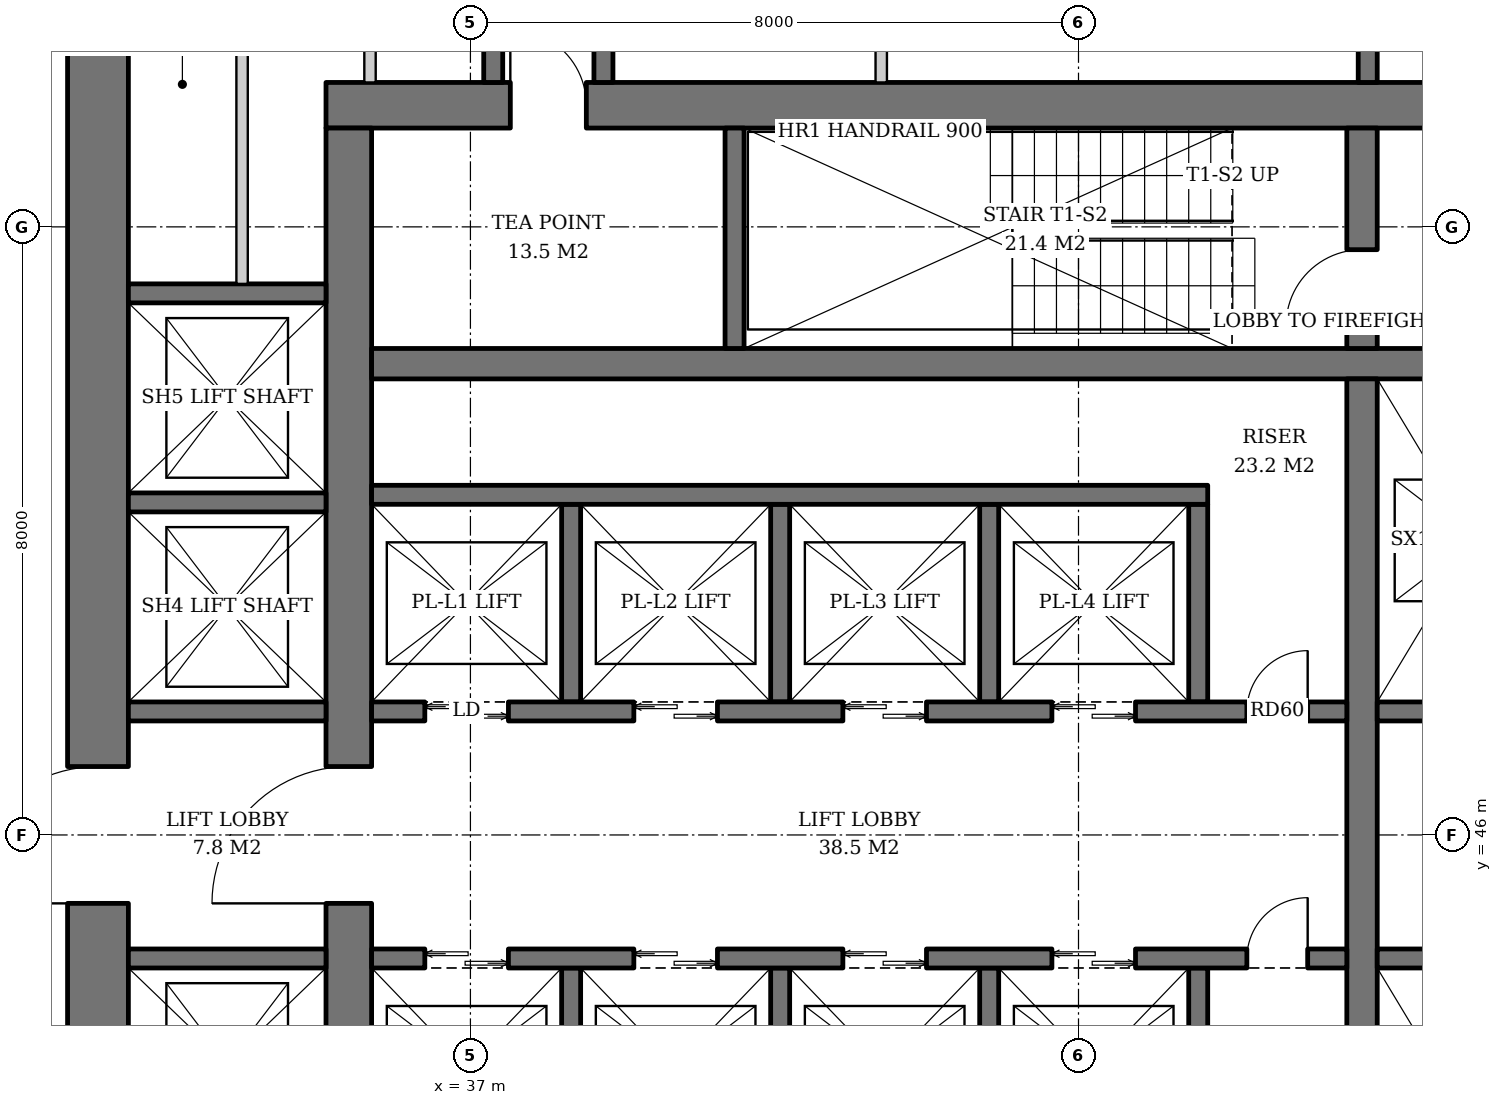
"""IFC4 building model, lengths in metres.
Left out: names, types, materials, properties, quantities, classifications, styles, units other than length and angle.
Written with IfcOpenShell. Run it as: python <this file> out.ifc"""

import sys

from ifc_helpers import new_model, si_unit, direction, frame, frame_2d, origin, place, context, subcontext, project, spatial, rectangle, extrude, element, fill, save


model = new_model("IFC4")
c1 = context("Model", 3, precision=1e-05, world=origin(), true_north=direction((0.0, 1.0)))
c2 = subcontext(c1, "Body", "Model", "MODEL_VIEW")
j1 = project(units=[si_unit("LENGTHUNIT", "METRE"), si_unit("PLANEANGLEUNIT", "RADIAN")], contexts=[c1])
p1 = place(None, origin())
s1 = spatial("IfcSite", under=j1, at=p1, CompositionType="ELEMENT")
p2 = place(p1, origin())
s2 = spatial("IfcBuilding", under=s1, at=p2, CompositionType="ELEMENT")
p3 = place(p2, frame((0.0, 0.0, 78.0)))
s3 = spatial("IfcBuildingStorey", under=s2, at=p3, CompositionType="ELEMENT", Elevation=78.0)
p4 = place(p3, frame((35.1, 55.6, 0.0), z_axis=(0.0, 0.0, 1.0), x_axis=(1.0, 0.0, 0.0)))
e1 = element("IfcWall", 1, at=p4, inside=s3, PredefinedType="SHEAR", context=c2, shape_type="SweptSolid", body=[
    extrude(rectangle(XDim=19.8, YDim=0.6, at=frame_2d((9.9, 0.0))), origin(), (0.0, 0.0, 1.0), 3.8),
])
p5 = place(p4, frame((14.54, 0.0, 0.0)))
e2 = element("IfcOpeningElement", 2, at=p5, cuts=e1, PredefinedType="OPENING", context=c2, shape_type="SweptSolid", body=[
    extrude(rectangle(XDim=1.0, YDim=2.1, at=frame_2d((0.5, 1.05))), frame((0.0, 0.31, 0.0), z_axis=(0.0, -1.0, 0.0), x_axis=(1.0, 0.0, 0.0)), (0.0, 0.0, 1.0), 0.62),
])
p6 = place(p4, frame((2.425, 0.0, 0.0)))
e3 = element("IfcOpeningElement", 3, at=p6, cuts=e1, PredefinedType="OPENING", context=c2, shape_type="SweptSolid", body=[
    extrude(rectangle(XDim=1.0, YDim=2.1, at=frame_2d((0.5, 1.05))), frame((0.0, 0.31, 0.0), z_axis=(0.0, -1.0, 0.0), x_axis=(1.0, 0.0, 0.0)), (0.0, 0.0, 1.0), 0.62),
])
p7 = place(p3, frame((35.4, 36.7, 0.0), z_axis=(0.0, 0.0, 1.0), x_axis=(0.0, 1.0, 0.0)))
e4 = element("IfcWall", 4, at=p7, inside=s3, PredefinedType="SHEAR", context=c2, shape_type="SweptSolid", body=[
    extrude(rectangle(XDim=18.6, YDim=0.6, at=frame_2d((9.3, 0.0))), origin(), (0.0, 0.0, 1.0), 3.8),
])
p8 = place(p7, frame((8.4, 0.0, 0.0)))
e5 = element("IfcOpeningElement", 5, at=p8, cuts=e4, PredefinedType="OPENING", context=c2, shape_type="SweptSolid", body=[
    extrude(rectangle(XDim=1.8, YDim=2.4, at=frame_2d((0.9, 1.2))), frame((0.0, 0.31, 0.0), z_axis=(0.0, -1.0, 0.0), x_axis=(1.0, 0.0, 0.0)), (0.0, 0.0, 1.0), 0.62),
])
p9 = place(p3, frame((32.1, 33.5, 0.0), z_axis=(0.0, 0.0, 1.0), x_axis=(0.0, 1.0, 0.0)))
e6 = element("IfcWall", 6, at=p9, inside=s3, PredefinedType="SHEAR", context=c2, shape_type="SweptSolid", body=[
    extrude(rectangle(XDim=25.0, YDim=0.8, at=frame_2d((12.5, 0.0))), origin(), (0.0, 0.0, 1.0), 3.8),
])
p10 = place(p9, frame((11.6, 0.0, 0.0)))
e7 = element("IfcOpeningElement", 7, at=p10, cuts=e6, PredefinedType="OPENING", context=c2, shape_type="SweptSolid", body=[
    extrude(rectangle(XDim=1.8, YDim=2.4, at=frame_2d((0.9, 1.2))), frame((0.0, 0.41, 0.0), z_axis=(0.0, -1.0, 0.0), x_axis=(1.0, 0.0, 0.0)), (0.0, 0.0, 1.0), 0.82),
])
p11 = place(p3, frame((35.7, 52.2, 0.0), z_axis=(0.0, 0.0, 1.0), x_axis=(1.0, 0.0, 0.0)))
e8 = element("IfcWall", 8, at=p11, inside=s3, PredefinedType="SHEAR", context=c2, shape_type="SweptSolid", body=[
    extrude(rectangle(XDim=18.6, YDim=0.4, at=frame_2d((9.3, 0.0))), origin(), (0.0, 0.0, 1.0), 3.8),
])
p12 = place(p3, frame((48.73, 40.0, 0.0), z_axis=(0.0, 0.0, 1.0), x_axis=(0.0, 1.0, 0.0)))
e9 = element("IfcWall", 9, at=p12, inside=s3, PredefinedType="SHEAR", context=c2, shape_type="SweptSolid", body=[
    extrude(rectangle(XDim=12.0, YDim=0.4, at=frame_2d((6.0, 0.0))), origin(), (0.0, 0.0, 1.0), 3.8),
])
p13 = place(p3, frame((48.73, 52.4, 0.0), z_axis=(0.0, 0.0, 1.0), x_axis=(0.0, 1.0, 0.0)))
e10 = element("IfcWall", 10, at=p13, inside=s3, PredefinedType="SHEAR", context=c2, shape_type="SweptSolid", body=[
    extrude(rectangle(XDim=2.9, YDim=0.4, at=frame_2d((1.45, 0.0))), origin(), (0.0, 0.0, 1.0), 3.8),
])
p14 = place(p13, frame((0.3, 0.0, 0.0)))
e11 = element("IfcOpeningElement", 11, at=p14, cuts=e10, PredefinedType="OPENING", context=c2, shape_type="SweptSolid", body=[
    extrude(rectangle(XDim=1.0, YDim=2.1, at=frame_2d((0.5, 1.05))), frame((0.0, 0.21, 0.0), z_axis=(0.0, -1.0, 0.0), x_axis=(1.0, 0.0, 0.0)), (0.0, 0.0, 1.0), 0.42),
])
p15 = place(p3, frame((40.475, 52.4, 0.0), z_axis=(0.0, 0.0, 1.0), x_axis=(0.0, 1.0, 0.0)))
e12 = element("IfcWall", 12, at=p15, inside=s3, PredefinedType="SHEAR", context=c2, shape_type="SweptSolid", body=[
    extrude(rectangle(XDim=2.9, YDim=0.25, at=frame_2d((1.45, 0.0))), origin(), (0.0, 0.0, 1.0), 3.8),
])
for number, where, z_axis, x_axis in (
    (13, (38.325, 47.75, 0.0), (0.0, 0.0, 1.0), (0.0, 1.0, 0.0)),
    (14, (41.075, 47.75, 0.0), (0.0, 0.0, 1.0), (0.0, 1.0, 0.0)),
    (15, (43.825, 47.75, 0.0), (0.0, 0.0, 1.0), (0.0, 1.0, 0.0)),
    (16, (46.575, 47.75, 0.0), (0.0, 0.0, 1.0), (0.0, 1.0, 0.0)),
):
    element("IfcWall", number, at=place(p3, frame(where, z_axis=z_axis, x_axis=x_axis)), inside=s3, PredefinedType="SHEAR", context=c2, shape_type="SweptSolid", body=[
        extrude(rectangle(XDim=2.6, YDim=0.25, at=frame_2d((1.3, 0.0))), origin(), (0.0, 0.0, 1.0), 3.8),
    ])
p16 = place(p3, frame((35.7, 50.475, 0.0), z_axis=(0.0, 0.0, 1.0), x_axis=(1.0, 0.0, 0.0)))
e17 = element("IfcWall", 17, at=p16, inside=s3, PredefinedType="SHEAR", context=c2, shape_type="SweptSolid", body=[
    extrude(rectangle(XDim=11.0, YDim=0.25, at=frame_2d((5.5, 0.0))), origin(), (0.0, 0.0, 1.0), 3.8),
])
p17 = place(p3, frame((35.7, 47.625, 0.0), z_axis=(0.0, 0.0, 1.0), x_axis=(1.0, 0.0, 0.0)))
e18 = element("IfcWall", 18, at=p17, inside=s3, PredefinedType="SHEAR", context=c2, shape_type="SweptSolid", body=[
    extrude(rectangle(XDim=12.83, YDim=0.25, at=frame_2d((6.415, 0.0))), origin(), (0.0, 0.0, 1.0), 3.8),
])
p18 = place(p17, frame((0.7, 0.0, 0.0)))
e19 = element("IfcOpeningElement", 19, at=p18, cuts=e18, PredefinedType="OPENING", context=c2, shape_type="SweptSolid", body=[
    extrude(rectangle(XDim=1.1, YDim=2.2, at=frame_2d((0.55, 1.1))), frame((0.0, 0.135, 0.0), z_axis=(0.0, -1.0, 0.0), x_axis=(1.0, 0.0, 0.0)), (0.0, 0.0, 1.0), 0.27),
])
p19 = place(p17, frame((3.45, 0.0, 0.0)))
e20 = element("IfcOpeningElement", 20, at=p19, cuts=e18, PredefinedType="OPENING", context=c2, shape_type="SweptSolid", body=[
    extrude(rectangle(XDim=1.1, YDim=2.2, at=frame_2d((0.55, 1.1))), frame((0.0, 0.135, 0.0), z_axis=(0.0, -1.0, 0.0), x_axis=(1.0, 0.0, 0.0)), (0.0, 0.0, 1.0), 0.27),
])
p20 = place(p17, frame((6.2, 0.0, 0.0)))
e21 = element("IfcOpeningElement", 21, at=p20, cuts=e18, PredefinedType="OPENING", context=c2, shape_type="SweptSolid", body=[
    extrude(rectangle(XDim=1.1, YDim=2.2, at=frame_2d((0.55, 1.1))), frame((0.0, 0.135, 0.0), z_axis=(0.0, -1.0, 0.0), x_axis=(1.0, 0.0, 0.0)), (0.0, 0.0, 1.0), 0.27),
])
p21 = place(p17, frame((8.95, 0.0, 0.0)))
e22 = element("IfcOpeningElement", 22, at=p21, cuts=e18, PredefinedType="OPENING", context=c2, shape_type="SweptSolid", body=[
    extrude(rectangle(XDim=1.1, YDim=2.2, at=frame_2d((0.55, 1.1))), frame((0.0, 0.135, 0.0), z_axis=(0.0, -1.0, 0.0), x_axis=(1.0, 0.0, 0.0)), (0.0, 0.0, 1.0), 0.27),
])
p22 = place(p17, frame((11.515, 0.0, 0.0)))
e23 = element("IfcOpeningElement", 23, at=p22, cuts=e18, PredefinedType="OPENING", context=c2, shape_type="SweptSolid", body=[
    extrude(rectangle(XDim=0.8, YDim=2.0, at=frame_2d((0.4, 1.0))), frame((0.0, 0.135, 0.0), z_axis=(0.0, -1.0, 0.0), x_axis=(1.0, 0.0, 0.0)), (0.0, 0.0, 1.0), 0.27),
])
for number, where, z_axis, x_axis in (
    (24, (38.325, 44.25, 0.0), (0.0, 0.0, 1.0), (0.0, -1.0, 0.0)),
    (25, (41.075, 44.25, 0.0), (0.0, 0.0, 1.0), (0.0, -1.0, 0.0)),
    (26, (43.825, 44.25, 0.0), (0.0, 0.0, 1.0), (0.0, -1.0, 0.0)),
    (27, (46.575, 44.25, 0.0), (0.0, 0.0, 1.0), (0.0, -1.0, 0.0)),
):
    element("IfcWall", number, at=place(p3, frame(where, z_axis=z_axis, x_axis=x_axis)), inside=s3, PredefinedType="SHEAR", context=c2, shape_type="SweptSolid", body=[
        extrude(rectangle(XDim=2.6, YDim=0.25, at=frame_2d((1.3, 0.0))), origin(), (0.0, 0.0, 1.0), 3.8),
    ])
p23 = place(p3, frame((35.7, 44.375, 0.0), z_axis=(0.0, 0.0, 1.0), x_axis=(1.0, 0.0, 0.0)))
e28 = element("IfcWall", 28, at=p23, inside=s3, PredefinedType="SHEAR", context=c2, shape_type="SweptSolid", body=[
    extrude(rectangle(XDim=12.83, YDim=0.25, at=frame_2d((6.415, 0.0))), origin(), (0.0, 0.0, 1.0), 3.8),
])
p24 = place(p23, frame((0.7, 0.0, 0.0)))
e29 = element("IfcOpeningElement", 29, at=p24, cuts=e28, PredefinedType="OPENING", context=c2, shape_type="SweptSolid", body=[
    extrude(rectangle(XDim=1.1, YDim=2.2, at=frame_2d((0.55, 1.1))), frame((0.0, 0.135, 0.0), z_axis=(0.0, -1.0, 0.0), x_axis=(1.0, 0.0, 0.0)), (0.0, 0.0, 1.0), 0.27),
])
p25 = place(p23, frame((3.45, 0.0, 0.0)))
e30 = element("IfcOpeningElement", 30, at=p25, cuts=e28, PredefinedType="OPENING", context=c2, shape_type="SweptSolid", body=[
    extrude(rectangle(XDim=1.1, YDim=2.2, at=frame_2d((0.55, 1.1))), frame((0.0, 0.135, 0.0), z_axis=(0.0, -1.0, 0.0), x_axis=(1.0, 0.0, 0.0)), (0.0, 0.0, 1.0), 0.27),
])
p26 = place(p23, frame((6.2, 0.0, 0.0)))
e31 = element("IfcOpeningElement", 31, at=p26, cuts=e28, PredefinedType="OPENING", context=c2, shape_type="SweptSolid", body=[
    extrude(rectangle(XDim=1.1, YDim=2.2, at=frame_2d((0.55, 1.1))), frame((0.0, 0.135, 0.0), z_axis=(0.0, -1.0, 0.0), x_axis=(1.0, 0.0, 0.0)), (0.0, 0.0, 1.0), 0.27),
])
p27 = place(p23, frame((8.95, 0.0, 0.0)))
e32 = element("IfcOpeningElement", 32, at=p27, cuts=e28, PredefinedType="OPENING", context=c2, shape_type="SweptSolid", body=[
    extrude(rectangle(XDim=1.1, YDim=2.2, at=frame_2d((0.55, 1.1))), frame((0.0, 0.135, 0.0), z_axis=(0.0, -1.0, 0.0), x_axis=(1.0, 0.0, 0.0)), (0.0, 0.0, 1.0), 0.27),
])
p28 = place(p23, frame((11.515, 0.0, 0.0)))
e33 = element("IfcOpeningElement", 33, at=p28, cuts=e28, PredefinedType="OPENING", context=c2, shape_type="SweptSolid", body=[
    extrude(rectangle(XDim=0.8, YDim=2.0, at=frame_2d((0.4, 1.0))), frame((0.0, 0.135, 0.0), z_axis=(0.0, -1.0, 0.0), x_axis=(1.0, 0.0, 0.0)), (0.0, 0.0, 1.0), 0.27),
])
for number, where, z_axis, x_axis in (
    (34, (48.93, 47.625, 0.0), (0.0, 0.0, 1.0), (1.0, 0.0, 0.0)),
    (35, (48.93, 44.375, 0.0), (0.0, 0.0, 1.0), (1.0, 0.0, 0.0)),
):
    element("IfcWall", number, at=place(p3, frame(where, z_axis=z_axis, x_axis=x_axis)), inside=s3, PredefinedType="SHEAR", context=c2, shape_type="SweptSolid", body=[
        extrude(rectangle(XDim=5.37, YDim=0.25, at=frame_2d((2.685, 0.0))), origin(), (0.0, 0.0, 1.0), 3.8),
    ])
for number, where, z_axis, x_axis in (
    (36, (32.5, 44.375, 0.0), (0.0, 0.0, 1.0), (1.0, 0.0, 0.0)),
    (37, (32.5, 47.625, 0.0), (0.0, 0.0, 1.0), (1.0, 0.0, 0.0)),
    (38, (32.5, 50.375, 0.0), (0.0, 0.0, 1.0), (1.0, 0.0, 0.0)),
    (39, (32.5, 53.125, 0.0), (0.0, 0.0, 1.0), (1.0, 0.0, 0.0)),
):
    element("IfcWall", number, at=place(p3, frame(where, z_axis=z_axis, x_axis=x_axis)), inside=s3, PredefinedType="SHEAR", context=c2, shape_type="SweptSolid", body=[
        extrude(rectangle(XDim=2.6, YDim=0.25, at=frame_2d((1.3, 0.0))), origin(), (0.0, 0.0, 1.0), 3.8),
    ])
for number, where, z_axis, x_axis in (
    (40, (48.805, 55.9, 0.0), (0.0, 0.0, 1.0), (0.0, 1.0, 0.0)),
    (41, (37.3, 55.9, 0.0), (0.0, 0.0, 1.0), (0.0, 1.0, 0.0)),
    (42, (38.75, 55.9, 0.0), (0.0, 0.0, 1.0), (0.0, 1.0, 0.0)),
):
    element("IfcWall", number, at=place(p3, frame(where, z_axis=z_axis, x_axis=x_axis)), inside=s3, PredefinedType="SOLIDWALL", context=c2, shape_type="SweptSolid", body=[
        extrude(rectangle(XDim=2.6, YDim=0.25, at=frame_2d((1.3, 0.0))), origin(), (0.0, 0.0, 1.0), 3.52),
    ])
p29 = place(p3, frame((33.996, 53.25, 0.0), z_axis=(0.0, 0.0, 1.0), x_axis=(0.0, 1.0, 0.0)))
e43 = element("IfcWall", 43, at=p29, inside=s3, PredefinedType="SOLIDWALL", context=c2, shape_type="SweptSolid", body=[
    extrude(rectangle(XDim=5.25, YDim=0.15, at=frame_2d((2.625, 0.0))), origin(), (0.0, 0.0, 1.0), 3.52),
])
for number, where, z_axis, x_axis in (
    (44, (35.679, 55.9, 0.0), (0.0, 0.0, 1.0), (0.0, 1.0, 0.0)),
    (45, (42.405, 55.9, 0.0), (0.0, 0.0, 1.0), (0.0, 1.0, 0.0)),
):
    element("IfcWall", number, at=place(p3, frame(where, z_axis=z_axis, x_axis=x_axis)), inside=s3, PredefinedType="SOLIDWALL", context=c2, shape_type="SweptSolid", body=[
        extrude(rectangle(XDim=2.6, YDim=0.15, at=frame_2d((1.3, 0.0))), origin(), (0.0, 0.0, 1.0), 3.52),
    ])
p30 = place(p18, origin())
e46 = element("IfcDoor", 46, at=p30, inside=s3, OperationType="DOUBLE_DOOR_SLIDING", PredefinedType="DOOR", context=c2, shape_type="SweptSolid", body=[
    extrude(rectangle(XDim=1.1, YDim=2.2, at=frame_2d((0.55, 1.1))), frame((0.0, 0.025, 0.0), z_axis=(0.0, -1.0, 0.0), x_axis=(1.0, 0.0, 0.0)), (0.0, 0.0, 1.0), 0.05),
])
fill(e19, e46)
p31 = place(p19, origin())
e47 = element("IfcDoor", 47, at=p31, inside=s3, OperationType="DOUBLE_DOOR_SLIDING", PredefinedType="DOOR", context=c2, shape_type="SweptSolid", body=[
    extrude(rectangle(XDim=1.1, YDim=2.2, at=frame_2d((0.55, 1.1))), frame((0.0, 0.025, 0.0), z_axis=(0.0, -1.0, 0.0), x_axis=(1.0, 0.0, 0.0)), (0.0, 0.0, 1.0), 0.05),
])
fill(e20, e47)
p32 = place(p20, origin())
e48 = element("IfcDoor", 48, at=p32, inside=s3, OperationType="DOUBLE_DOOR_SLIDING", PredefinedType="DOOR", context=c2, shape_type="SweptSolid", body=[
    extrude(rectangle(XDim=1.1, YDim=2.2, at=frame_2d((0.55, 1.1))), frame((0.0, 0.025, 0.0), z_axis=(0.0, -1.0, 0.0), x_axis=(1.0, 0.0, 0.0)), (0.0, 0.0, 1.0), 0.05),
])
fill(e21, e48)
p33 = place(p21, origin())
e49 = element("IfcDoor", 49, at=p33, inside=s3, OperationType="DOUBLE_DOOR_SLIDING", PredefinedType="DOOR", context=c2, shape_type="SweptSolid", body=[
    extrude(rectangle(XDim=1.1, YDim=2.2, at=frame_2d((0.55, 1.1))), frame((0.0, 0.025, 0.0), z_axis=(0.0, -1.0, 0.0), x_axis=(1.0, 0.0, 0.0)), (0.0, 0.0, 1.0), 0.05),
])
fill(e22, e49)
p34 = place(p22, origin())
e50 = element("IfcDoor", 50, at=p34, inside=s3, OperationType="SINGLE_SWING_RIGHT", PredefinedType="DOOR", context=c2, shape_type="SweptSolid", body=[
    extrude(rectangle(XDim=0.8, YDim=2.0, at=frame_2d((0.4, 1.0))), frame((0.0, 0.025, 0.0), z_axis=(0.0, -1.0, 0.0), x_axis=(1.0, 0.0, 0.0)), (0.0, 0.0, 1.0), 0.05),
])
fill(e23, e50)
p35 = place(p24, origin())
e51 = element("IfcDoor", 51, at=p35, inside=s3, OperationType="DOUBLE_DOOR_SLIDING", PredefinedType="DOOR", context=c2, shape_type="SweptSolid", body=[
    extrude(rectangle(XDim=1.1, YDim=2.2, at=frame_2d((0.55, 1.1))), frame((0.0, 0.025, 0.0), z_axis=(0.0, -1.0, 0.0), x_axis=(1.0, 0.0, 0.0)), (0.0, 0.0, 1.0), 0.05),
])
fill(e29, e51)
p36 = place(p25, origin())
e52 = element("IfcDoor", 52, at=p36, inside=s3, OperationType="DOUBLE_DOOR_SLIDING", PredefinedType="DOOR", context=c2, shape_type="SweptSolid", body=[
    extrude(rectangle(XDim=1.1, YDim=2.2, at=frame_2d((0.55, 1.1))), frame((0.0, 0.025, 0.0), z_axis=(0.0, -1.0, 0.0), x_axis=(1.0, 0.0, 0.0)), (0.0, 0.0, 1.0), 0.05),
])
fill(e30, e52)
p37 = place(p26, origin())
e53 = element("IfcDoor", 53, at=p37, inside=s3, OperationType="DOUBLE_DOOR_SLIDING", PredefinedType="DOOR", context=c2, shape_type="SweptSolid", body=[
    extrude(rectangle(XDim=1.1, YDim=2.2, at=frame_2d((0.55, 1.1))), frame((0.0, 0.025, 0.0), z_axis=(0.0, -1.0, 0.0), x_axis=(1.0, 0.0, 0.0)), (0.0, 0.0, 1.0), 0.05),
])
fill(e31, e53)
p38 = place(p27, origin())
e54 = element("IfcDoor", 54, at=p38, inside=s3, OperationType="DOUBLE_DOOR_SLIDING", PredefinedType="DOOR", context=c2, shape_type="SweptSolid", body=[
    extrude(rectangle(XDim=1.1, YDim=2.2, at=frame_2d((0.55, 1.1))), frame((0.0, 0.025, 0.0), z_axis=(0.0, -1.0, 0.0), x_axis=(1.0, 0.0, 0.0)), (0.0, 0.0, 1.0), 0.05),
])
fill(e32, e54)
p39 = place(p28, origin())
e55 = element("IfcDoor", 55, at=p39, inside=s3, OperationType="SINGLE_SWING_RIGHT", PredefinedType="DOOR", context=c2, shape_type="SweptSolid", body=[
    extrude(rectangle(XDim=0.8, YDim=2.0, at=frame_2d((0.4, 1.0))), frame((0.0, 0.025, 0.0), z_axis=(0.0, -1.0, 0.0), x_axis=(1.0, 0.0, 0.0)), (0.0, 0.0, 1.0), 0.05),
])
fill(e33, e55)
p40 = place(p14, origin())
e56 = element("IfcDoor", 56, at=p40, inside=s3, OperationType="SINGLE_SWING_LEFT", PredefinedType="DOOR", context=c2, shape_type="SweptSolid", body=[
    extrude(rectangle(XDim=1.0, YDim=2.1, at=frame_2d((0.5, 1.05))), frame((0.0, 0.025, 0.0), z_axis=(0.0, -1.0, 0.0), x_axis=(1.0, 0.0, 0.0)), (0.0, 0.0, 1.0), 0.05),
])
fill(e11, e56)
p41 = place(p8, origin())
e57 = element("IfcDoor", 57, at=p41, inside=s3, OperationType="DOUBLE_DOOR_SINGLE_SWING", PredefinedType="DOOR", context=c2, shape_type="SweptSolid", body=[
    extrude(rectangle(XDim=1.8, YDim=2.4, at=frame_2d((0.9, 1.2))), frame((0.0, 0.025, 0.0), z_axis=(0.0, -1.0, 0.0), x_axis=(1.0, 0.0, 0.0)), (0.0, 0.0, 1.0), 0.05),
])
fill(e5, e57)
p42 = place(p10, origin())
e58 = element("IfcDoor", 58, at=p42, inside=s3, OperationType="DOUBLE_DOOR_SINGLE_SWING", PredefinedType="DOOR", context=c2, shape_type="SweptSolid", body=[
    extrude(rectangle(XDim=1.8, YDim=2.4, at=frame_2d((0.9, 1.2))), frame((0.0, 0.025, 0.0), z_axis=(0.0, -1.0, 0.0), x_axis=(1.0, 0.0, 0.0)), (0.0, 0.0, 1.0), 0.05),
])
fill(e7, e58)
p43 = place(p6, origin())
e59 = element("IfcDoor", 59, at=p43, inside=s3, OperationType="SINGLE_SWING_LEFT", PredefinedType="DOOR", context=c2, shape_type="SweptSolid", body=[
    extrude(rectangle(XDim=1.0, YDim=2.1, at=frame_2d((0.5, 1.05))), frame((0.0, -0.24, 0.0), z_axis=(0.0, -1.0, 0.0), x_axis=(1.0, 0.0, 0.0)), (0.0, 0.0, 1.0), 0.05),
])
fill(e3, e59)
save(model, sys.argv[1])
